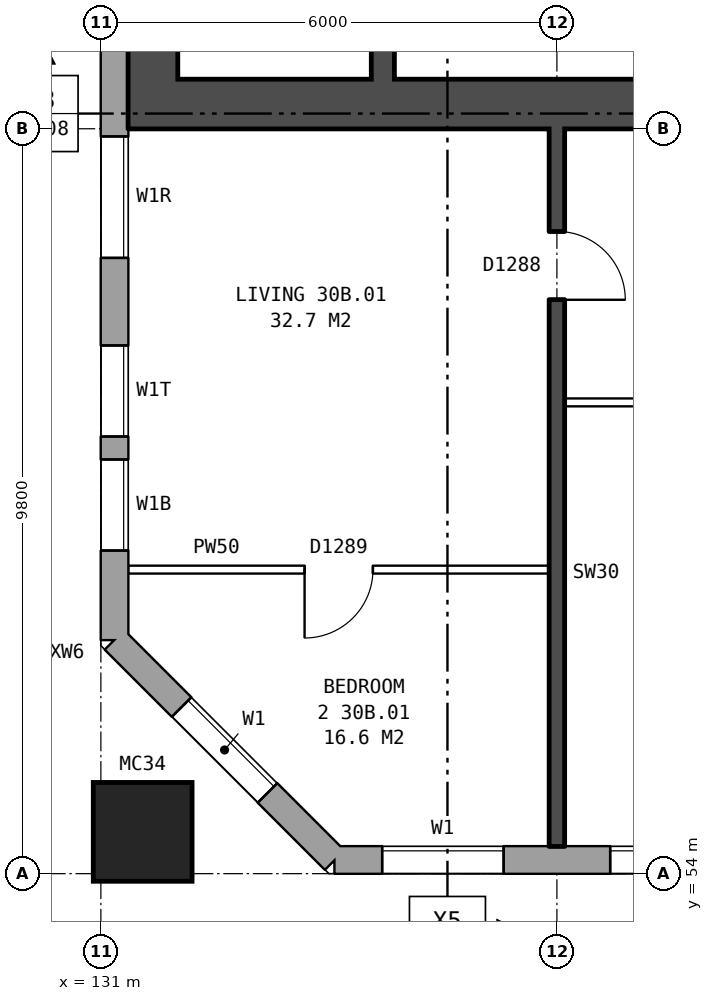
"""IFC4 building model, lengths in metres.
Left out: names, types, materials, properties, quantities, classifications, styles, units other than length and angle.
Written with IfcOpenShell. Run it as: python <this file> out.ifc"""

import sys

from ifc_helpers import new_model, si_unit, direction, frame, frame_2d, origin, origin_2d, place, context, subcontext, project, spatial, rectangle, hollow_rectangle, extrude, element, fill, save


model = new_model("IFC4")
c1 = context("Model", 3, precision=1e-05, world=origin(), true_north=direction((0.0, 1.0)))
c2 = subcontext(c1, "Body", "Model", "MODEL_VIEW")
j1 = project(units=[si_unit("LENGTHUNIT", "METRE"), si_unit("PLANEANGLEUNIT", "RADIAN")], contexts=[c1])
p1 = place(None, origin())
s1 = spatial("IfcSite", under=j1, at=p1, CompositionType="ELEMENT")
p2 = place(p1, origin())
s2 = spatial("IfcBuilding", under=s1, at=p2, CompositionType="ELEMENT")
p3 = place(p2, frame((0.0, 0.0, 108.8)))
s3 = spatial("IfcBuildingStorey", under=s2, at=p3, CompositionType="ELEMENT", Elevation=108.8)
p4 = place(p3, frame((131.55, 54.55, 0.0), z_axis=(0.0, 0.0, 1.0), x_axis=(1.0, 0.0, 0.0)))
e1 = element("IfcColumn", 1, at=p4, inside=s3, PredefinedType="COLUMN", context=c2, shape_type="SweptSolid", body=[
    extrude(hollow_rectangle(XDim=1.3, YDim=1.3, WallThickness=0.07, at=origin_2d()), origin(), (0.0, 0.0, 1.0), 3.1),
])
p5 = place(p3, frame((131.18, 57.075, 0.0), z_axis=(0.0, 0.0, 1.0), x_axis=(0.707106781187, -0.707106781187, 0.0)))
e2 = element("IfcWall", 2, at=p5, inside=s3, PredefinedType="STANDARD", context=c2, shape_type="SweptSolid", body=[
    extrude(rectangle(XDim=4.094, YDim=0.36, at=frame_2d((2.047, 0.0))), origin(), (0.0, 0.0, 1.0), 2.85),
])
p6 = place(p5, frame((1.247, 0.0, 0.8)))
e3 = element("IfcOpeningElement", 3, at=p6, cuts=e2, PredefinedType="OPENING", context=c2, shape_type="SweptSolid", body=[
    extrude(rectangle(XDim=1.6, YDim=1.8, at=frame_2d((0.8, 0.9))), frame((0.0, 0.19, 0.0), z_axis=(0.0, -1.0, 0.0), x_axis=(1.0, 0.0, 0.0)), (0.0, 0.0, 1.0), 0.38),
])
p7 = place(p3, frame((134.075, 54.18, 0.0), z_axis=(0.0, 0.0, 1.0), x_axis=(1.0, 0.0, 0.0)))
e4 = element("IfcWall", 4, at=p7, inside=s3, PredefinedType="STANDARD", context=c2, shape_type="SweptSolid", body=[
    extrude(rectangle(XDim=36.851, YDim=0.36, at=frame_2d((18.425, 0.0))), origin(), (0.0, 0.0, 1.0), 2.85),
])
p8 = place(p7, frame((0.625, 0.0, 0.8)))
e5 = element("IfcOpeningElement", 5, at=p8, cuts=e4, PredefinedType="OPENING", context=c2, shape_type="SweptSolid", body=[
    extrude(rectangle(XDim=1.6, YDim=1.8, at=frame_2d((0.8, 0.9))), frame((0.0, 0.19, 0.0), z_axis=(0.0, -1.0, 0.0), x_axis=(1.0, 0.0, 0.0)), (0.0, 0.0, 1.0), 0.38),
])
p9 = place(p7, frame((3.625, 0.0, 0.8)))
e6 = element("IfcOpeningElement", 6, at=p9, cuts=e4, PredefinedType="OPENING", context=c2, shape_type="SweptSolid", body=[
    extrude(rectangle(XDim=1.6, YDim=1.8, at=frame_2d((0.8, 0.9))), frame((0.0, 0.19, 0.0), z_axis=(0.0, -1.0, 0.0), x_axis=(1.0, 0.0, 0.0)), (0.0, 0.0, 1.0), 0.38),
])
p10 = place(p7, frame((6.625, 0.0, 0.8)))
e7 = element("IfcOpeningElement", 7, at=p10, cuts=e4, PredefinedType="OPENING", context=c2, shape_type="SweptSolid", body=[
    extrude(rectangle(XDim=1.6, YDim=1.8, at=frame_2d((0.8, 0.9))), frame((0.0, 0.19, 0.0), z_axis=(0.0, -1.0, 0.0), x_axis=(1.0, 0.0, 0.0)), (0.0, 0.0, 1.0), 0.38),
])
p11 = place(p7, frame((9.625, 0.0, 0.8)))
e8 = element("IfcOpeningElement", 8, at=p11, cuts=e4, PredefinedType="OPENING", context=c2, shape_type="SweptSolid", body=[
    extrude(rectangle(XDim=1.6, YDim=1.8, at=frame_2d((0.8, 0.9))), frame((0.0, 0.19, 0.0), z_axis=(0.0, -1.0, 0.0), x_axis=(1.0, 0.0, 0.0)), (0.0, 0.0, 1.0), 0.38),
])
p12 = place(p7, frame((12.075, 0.0, 1.65)))
e9 = element("IfcOpeningElement", 9, at=p12, cuts=e4, PredefinedType="OPENING", context=c2, shape_type="SweptSolid", body=[
    extrude(rectangle(XDim=1.0, YDim=0.9, at=frame_2d((0.5, 0.45))), frame((0.0, 0.19, 0.0), z_axis=(0.0, -1.0, 0.0), x_axis=(1.0, 0.0, 0.0)), (0.0, 0.0, 1.0), 0.38),
])
p13 = place(p7, frame((15.625, 0.0, 0.8)))
e10 = element("IfcOpeningElement", 10, at=p13, cuts=e4, PredefinedType="OPENING", context=c2, shape_type="SweptSolid", body=[
    extrude(rectangle(XDim=1.6, YDim=1.8, at=frame_2d((0.8, 0.9))), frame((0.0, 0.19, 0.0), z_axis=(0.0, -1.0, 0.0), x_axis=(1.0, 0.0, 0.0)), (0.0, 0.0, 1.0), 0.38),
])
p14 = place(p7, frame((18.625, 0.0, 0.8)))
e11 = element("IfcOpeningElement", 11, at=p14, cuts=e4, PredefinedType="OPENING", context=c2, shape_type="SweptSolid", body=[
    extrude(rectangle(XDim=1.6, YDim=1.8, at=frame_2d((0.8, 0.9))), frame((0.0, 0.19, 0.0), z_axis=(0.0, -1.0, 0.0), x_axis=(1.0, 0.0, 0.0)), (0.0, 0.0, 1.0), 0.38),
])
p15 = place(p7, frame((21.125, 0.0, 0.8)))
e12 = element("IfcOpeningElement", 12, at=p15, cuts=e4, PredefinedType="OPENING", context=c2, shape_type="SweptSolid", body=[
    extrude(rectangle(XDim=1.4, YDim=0.9, at=frame_2d((0.7, 0.45))), frame((0.0, 0.19, 0.0), z_axis=(0.0, -1.0, 0.0), x_axis=(1.0, 0.0, 0.0)), (0.0, 0.0, 1.0), 0.38),
])
p16 = place(p7, frame((24.625, 0.0, 0.8)))
e13 = element("IfcOpeningElement", 13, at=p16, cuts=e4, PredefinedType="OPENING", context=c2, shape_type="SweptSolid", body=[
    extrude(rectangle(XDim=1.6, YDim=1.8, at=frame_2d((0.8, 0.9))), frame((0.0, 0.19, 0.0), z_axis=(0.0, -1.0, 0.0), x_axis=(1.0, 0.0, 0.0)), (0.0, 0.0, 1.0), 0.38),
])
p17 = place(p7, frame((27.625, 0.0, 0.8)))
e14 = element("IfcOpeningElement", 14, at=p17, cuts=e4, PredefinedType="OPENING", context=c2, shape_type="SweptSolid", body=[
    extrude(rectangle(XDim=1.6, YDim=1.8, at=frame_2d((0.8, 0.9))), frame((0.0, 0.19, 0.0), z_axis=(0.0, -1.0, 0.0), x_axis=(1.0, 0.0, 0.0)), (0.0, 0.0, 1.0), 0.38),
])
p18 = place(p7, frame((30.625, 0.0, 0.8)))
e15 = element("IfcOpeningElement", 15, at=p18, cuts=e4, PredefinedType="OPENING", context=c2, shape_type="SweptSolid", body=[
    extrude(rectangle(XDim=1.6, YDim=1.8, at=frame_2d((0.8, 0.9))), frame((0.0, 0.19, 0.0), z_axis=(0.0, -1.0, 0.0), x_axis=(1.0, 0.0, 0.0)), (0.0, 0.0, 1.0), 0.38),
])
p19 = place(p7, frame((33.625, 0.0, 0.8)))
e16 = element("IfcOpeningElement", 16, at=p19, cuts=e4, PredefinedType="OPENING", context=c2, shape_type="SweptSolid", body=[
    extrude(rectangle(XDim=1.6, YDim=1.8, at=frame_2d((0.8, 0.9))), frame((0.0, 0.19, 0.0), z_axis=(0.0, -1.0, 0.0), x_axis=(1.0, 0.0, 0.0)), (0.0, 0.0, 1.0), 0.38),
])
p20 = place(p7, frame((13.525, 0.0, 0.15)))
e17 = element("IfcOpeningElement", 17, at=p20, cuts=e4, PredefinedType="OPENING", context=c2, shape_type="SweptSolid", body=[
    extrude(rectangle(XDim=1.2, YDim=0.9, at=frame_2d((0.6, 0.45))), frame((0.0, 0.19, 0.0), z_axis=(0.0, -1.0, 0.0), x_axis=(1.0, 0.0, 0.0)), (0.0, 0.0, 1.0), 0.38),
])
p21 = place(p7, frame((23.725, 0.0, 1.7)))
e18 = element("IfcOpeningElement", 18, at=p21, cuts=e4, PredefinedType="OPENING", context=c2, shape_type="SweptSolid", body=[
    extrude(rectangle(XDim=0.6, YDim=0.9, at=frame_2d((0.3, 0.45))), frame((0.0, 0.19, 0.0), z_axis=(0.0, -1.0, 0.0), x_axis=(1.0, 0.0, 0.0)), (0.0, 0.0, 1.0), 0.38),
])
p22 = place(p3, frame((131.18, 82.925, 0.0), z_axis=(0.0, 0.0, 1.0), x_axis=(0.0, -1.0, 0.0)))
e19 = element("IfcWall", 19, at=p22, inside=s3, PredefinedType="STANDARD", context=c2, shape_type="SweptSolid", body=[
    extrude(rectangle(XDim=25.851, YDim=0.36, at=frame_2d((12.925, 0.0))), origin(), (0.0, 0.0, 1.0), 2.85),
])
p23 = place(p22, frame((0.3, 0.0, 0.8)))
e20 = element("IfcOpeningElement", 20, at=p23, cuts=e19, PredefinedType="OPENING", context=c2, shape_type="SweptSolid", body=[
    extrude(rectangle(XDim=1.4, YDim=1.8, at=frame_2d((0.7, 0.9))), frame((0.0, 0.19, 0.0), z_axis=(0.0, -1.0, 0.0), x_axis=(1.0, 0.0, 0.0)), (0.0, 0.0, 1.0), 0.38),
])
p24 = place(p22, frame((4.075, 0.0, 0.25)))
e21 = element("IfcOpeningElement", 21, at=p24, cuts=e19, PredefinedType="OPENING", context=c2, shape_type="SweptSolid", body=[
    extrude(rectangle(XDim=0.6, YDim=0.9, at=frame_2d((0.3, 0.45))), frame((0.0, 0.19, 0.0), z_axis=(0.0, -1.0, 0.0), x_axis=(1.0, 0.0, 0.0)), (0.0, 0.0, 1.0), 0.38),
])
p25 = place(p22, frame((19.225, 0.0, 1.7)))
e22 = element("IfcOpeningElement", 22, at=p25, cuts=e19, PredefinedType="OPENING", context=c2, shape_type="SweptSolid", body=[
    extrude(rectangle(XDim=1.6, YDim=0.9, at=frame_2d((0.8, 0.45))), frame((0.0, 0.19, 0.0), z_axis=(0.0, -1.0, 0.0), x_axis=(1.0, 0.0, 0.0)), (0.0, 0.0, 1.0), 0.38),
])
p26 = place(p22, frame((21.975, 0.0, 0.8)))
e23 = element("IfcOpeningElement", 23, at=p26, cuts=e19, PredefinedType="OPENING", context=c2, shape_type="SweptSolid", body=[
    extrude(rectangle(XDim=1.2, YDim=0.9, at=frame_2d((0.6, 0.45))), frame((0.0, 0.19, 0.0), z_axis=(0.0, -1.0, 0.0), x_axis=(1.0, 0.0, 0.0)), (0.0, 0.0, 1.0), 0.38),
])
p27 = place(p22, frame((2.0, 0.0, 0.8)))
e24 = element("IfcOpeningElement", 24, at=p27, cuts=e19, PredefinedType="OPENING", context=c2, shape_type="SweptSolid", body=[
    extrude(rectangle(XDim=0.8, YDim=1.5, at=frame_2d((0.4, 0.75))), frame((0.0, 0.19, 0.0), z_axis=(0.0, -1.0, 0.0), x_axis=(1.0, 0.0, 0.0)), (0.0, 0.0, 1.0), 0.38),
])
p28 = place(p22, frame((5.075, 0.0, 1.65)))
e25 = element("IfcOpeningElement", 25, at=p28, cuts=e19, PredefinedType="OPENING", context=c2, shape_type="SweptSolid", body=[
    extrude(rectangle(XDim=1.4, YDim=0.9, at=frame_2d((0.7, 0.45))), frame((0.0, 0.19, 0.0), z_axis=(0.0, -1.0, 0.0), x_axis=(1.0, 0.0, 0.0)), (0.0, 0.0, 1.0), 0.38),
])
p29 = place(p22, frame((23.475, 0.0, 0.8)))
e26 = element("IfcOpeningElement", 26, at=p29, cuts=e19, PredefinedType="OPENING", context=c2, shape_type="SweptSolid", body=[
    extrude(rectangle(XDim=1.2, YDim=1.8, at=frame_2d((0.6, 0.9))), frame((0.0, 0.19, 0.0), z_axis=(0.0, -1.0, 0.0), x_axis=(1.0, 0.0, 0.0)), (0.0, 0.0, 1.0), 0.38),
])
p30 = place(p3, frame((131.685, 64.45, 0.0), z_axis=(0.0, 0.0, 1.0), x_axis=(0.0, 1.0, 0.0)))
e27 = element("IfcWall", 27, at=p30, inside=s3, PredefinedType="SHEAR", context=c2, shape_type="SweptSolid", body=[
    extrude(rectangle(XDim=11.1, YDim=0.65, at=frame_2d((5.55, 0.0))), origin(), (0.0, 0.0, 1.0), 2.85),
])
p31 = place(p3, frame((139.76, 64.125, 0.0), z_axis=(0.0, 0.0, 1.0), x_axis=(-1.0, 0.0, 0.0)))
e28 = element("IfcWall", 28, at=p31, inside=s3, PredefinedType="SHEAR", context=c2, shape_type="SweptSolid", body=[
    extrude(rectangle(XDim=8.4, YDim=0.65, at=frame_2d((4.2, 0.0))), origin(), (0.0, 0.0, 1.0), 2.85),
])
p32 = place(p3, frame((134.71, 64.45, 0.0), z_axis=(0.0, 0.0, 1.0), x_axis=(0.0, 1.0, 0.0)))
e29 = element("IfcWall", 29, at=p32, inside=s3, PredefinedType="SHEAR", context=c2, shape_type="SweptSolid", body=[
    extrude(rectangle(XDim=6.65, YDim=0.3, at=frame_2d((3.325, 0.0))), origin(), (0.0, 0.0, 1.0), 2.85),
])
p33 = place(p3, frame((131.36, 58.0, 0.0), z_axis=(0.0, 0.0, 1.0), x_axis=(1.0, 0.0, 0.0)))
e30 = element("IfcWall", 30, at=p33, inside=s3, PredefinedType="PARTITIONING", context=c2, shape_type="SweptSolid", body=[
    extrude(rectangle(XDim=5.54, YDim=0.1, at=frame_2d((2.77, 0.0))), origin(), (0.0, 0.0, 1.0), 2.85),
])
p34 = place(p33, frame((2.32, 0.0, 0.0)))
e31 = element("IfcOpeningElement", 31, at=p34, cuts=e30, PredefinedType="OPENING", context=c2, shape_type="SweptSolid", body=[
    extrude(rectangle(XDim=0.9, YDim=2.1, at=frame_2d((0.45, 1.05))), frame((0.0, 0.06, 0.0), z_axis=(0.0, -1.0, 0.0), x_axis=(1.0, 0.0, 0.0)), (0.0, 0.0, 1.0), 0.12),
])
p35 = place(p3, frame((137.1, 60.2, 0.0), z_axis=(0.0, 0.0, 1.0), x_axis=(1.0, 0.0, 0.0)))
e32 = element("IfcWall", 32, at=p35, inside=s3, PredefinedType="PARTITIONING", context=c2, shape_type="SweptSolid", body=[
    extrude(rectangle(XDim=5.8, YDim=0.1, at=frame_2d((2.9, 0.0))), origin(), (0.0, 0.0, 1.0), 2.85),
])
p36 = place(p35, frame((1.3, 0.0, 0.0)))
e33 = element("IfcOpeningElement", 33, at=p36, cuts=e32, PredefinedType="OPENING", context=c2, shape_type="SweptSolid", body=[
    extrude(rectangle(XDim=0.9, YDim=2.1, at=frame_2d((0.45, 1.05))), frame((0.0, 0.06, 0.0), z_axis=(0.0, -1.0, 0.0), x_axis=(1.0, 0.0, 0.0)), (0.0, 0.0, 1.0), 0.12),
])
p37 = place(p35, frame((4.2, 0.0, 0.0)))
e34 = element("IfcOpeningElement", 34, at=p37, cuts=e32, PredefinedType="OPENING", context=c2, shape_type="SweptSolid", body=[
    extrude(rectangle(XDim=0.9, YDim=2.1, at=frame_2d((0.45, 1.05))), frame((0.0, 0.06, 0.0), z_axis=(0.0, -1.0, 0.0), x_axis=(1.0, 0.0, 0.0)), (0.0, 0.0, 1.0), 0.12),
])
p38 = place(p3, frame((137.0, 54.36, 0.0), z_axis=(0.0, 0.0, 1.0), x_axis=(0.0, 1.0, 0.0)))
e35 = element("IfcWall", 35, at=p38, inside=s3, PredefinedType="SOLIDWALL", context=c2, shape_type="SweptSolid", body=[
    extrude(rectangle(XDim=9.44, YDim=0.2, at=frame_2d((4.72, 0.0))), origin(), (0.0, 0.0, 1.0), 2.85),
])
p39 = place(p38, frame((7.19, 0.0, 0.0)))
e36 = element("IfcOpeningElement", 36, at=p39, cuts=e35, PredefinedType="OPENING", context=c2, shape_type="SweptSolid", body=[
    extrude(rectangle(XDim=0.9, YDim=2.1, at=frame_2d((0.45, 1.05))), frame((0.0, 0.11, 0.0), z_axis=(0.0, -1.0, 0.0), x_axis=(1.0, 0.0, 0.0)), (0.0, 0.0, 1.0), 0.22),
])
p40 = place(p6, origin())
e37 = element("IfcWindow", 37, at=p40, inside=s3, PartitioningType="SINGLE_PANEL", PredefinedType="WINDOW", context=c2, shape_type="SweptSolid", body=[
    extrude(rectangle(XDim=1.6, YDim=1.8, at=frame_2d((0.8, 0.9))), frame((0.0, 0.15, 0.0), z_axis=(0.0, -1.0, 0.0), x_axis=(1.0, 0.0, 0.0)), (0.0, 0.0, 1.0), 0.06),
])
fill(e3, e37)
p41 = place(p8, origin())
e38 = element("IfcWindow", 38, at=p41, inside=s3, PartitioningType="SINGLE_PANEL", PredefinedType="WINDOW", context=c2, shape_type="SweptSolid", body=[
    extrude(rectangle(XDim=1.6, YDim=1.8, at=frame_2d((0.8, 0.9))), frame((0.0, 0.15, 0.0), z_axis=(0.0, -1.0, 0.0), x_axis=(1.0, 0.0, 0.0)), (0.0, 0.0, 1.0), 0.06),
])
fill(e5, e38)
p42 = place(p9, origin())
e39 = element("IfcWindow", 39, at=p42, inside=s3, PartitioningType="SINGLE_PANEL", PredefinedType="WINDOW", context=c2, shape_type="SweptSolid", body=[
    extrude(rectangle(XDim=1.6, YDim=1.8, at=frame_2d((0.8, 0.9))), frame((0.0, 0.15, 0.0), z_axis=(0.0, -1.0, 0.0), x_axis=(1.0, 0.0, 0.0)), (0.0, 0.0, 1.0), 0.06),
])
fill(e6, e39)
p43 = place(p25, origin())
e40 = element("IfcWindow", 40, at=p43, inside=s3, PartitioningType="SINGLE_PANEL", PredefinedType="WINDOW", context=c2, shape_type="SweptSolid", body=[
    extrude(rectangle(XDim=1.6, YDim=0.9, at=frame_2d((0.8, 0.45))), frame((0.0, 0.15, 0.0), z_axis=(0.0, -1.0, 0.0), x_axis=(1.0, 0.0, 0.0)), (0.0, 0.0, 1.0), 0.06),
])
fill(e22, e40)
p44 = place(p26, origin())
e41 = element("IfcWindow", 41, at=p44, inside=s3, PartitioningType="SINGLE_PANEL", PredefinedType="WINDOW", context=c2, shape_type="SweptSolid", body=[
    extrude(rectangle(XDim=1.2, YDim=0.9, at=frame_2d((0.6, 0.45))), frame((0.0, 0.15, 0.0), z_axis=(0.0, -1.0, 0.0), x_axis=(1.0, 0.0, 0.0)), (0.0, 0.0, 1.0), 0.06),
])
fill(e23, e41)
p45 = place(p34, frame((0.9, 0.0, 0.0), z_axis=(0.0, 0.0, 1.0), x_axis=(-1.0, 0.0, 0.0)))
e42 = element("IfcDoor", 42, at=p45, inside=s3, OperationType="SINGLE_SWING_RIGHT", PredefinedType="DOOR", context=c2, shape_type="SweptSolid", body=[
    extrude(rectangle(XDim=0.9, YDim=2.1, at=frame_2d((0.45, 1.05))), frame((0.0, 0.025, 0.0), z_axis=(0.0, -1.0, 0.0), x_axis=(1.0, 0.0, 0.0)), (0.0, 0.0, 1.0), 0.05),
])
fill(e31, e42)
p46 = place(p39, frame((0.9, 0.0, 0.0), z_axis=(0.0, 0.0, 1.0), x_axis=(-1.0, 0.0, 0.0)))
e43 = element("IfcDoor", 43, at=p46, inside=s3, OperationType="SINGLE_SWING_RIGHT", PredefinedType="DOOR", context=c2, shape_type="SweptSolid", body=[
    extrude(rectangle(XDim=0.9, YDim=2.1, at=frame_2d((0.45, 1.05))), frame((0.0, 0.025, 0.0), z_axis=(0.0, -1.0, 0.0), x_axis=(1.0, 0.0, 0.0)), (0.0, 0.0, 1.0), 0.05),
])
fill(e36, e43)
p47 = place(p29, origin())
e44 = element("IfcWindow", 44, at=p47, inside=s3, PartitioningType="SINGLE_PANEL", PredefinedType="WINDOW", context=c2, shape_type="SweptSolid", body=[
    extrude(rectangle(XDim=1.2, YDim=1.8, at=frame_2d((0.6, 0.9))), frame((0.0, 0.15, 0.0), z_axis=(0.0, -1.0, 0.0), x_axis=(1.0, 0.0, 0.0)), (0.0, 0.0, 1.0), 0.06),
])
fill(e26, e44)
save(model, sys.argv[1])
